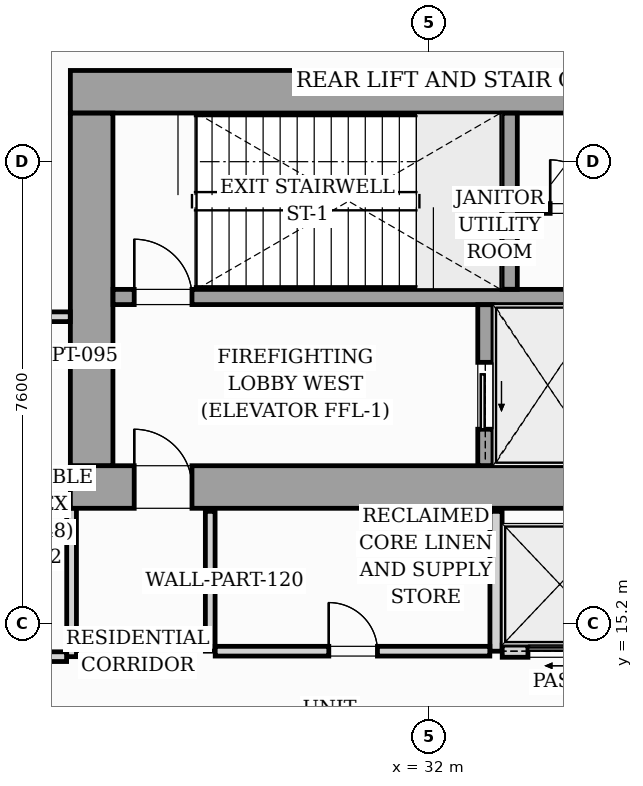
"""IFC4 building model, lengths in metres.
Left out: names, types, materials, properties, quantities, classifications, styles, units other than length and angle.
Written with IfcOpenShell. Run it as: python <this file> out.ifc"""

import sys

from ifc_helpers import new_model, si_unit, direction, frame, frame_2d, origin, origin_2d, place, context, subcontext, project, spatial, rectangle, i_section, extrude, source, transform, mapped, element, fill, save


model = new_model("IFC4")
c1 = context("Model", 3, precision=1e-05, world=origin(), true_north=direction((0.0, 1.0)))
c2 = subcontext(c1, "Body", "Model", "MODEL_VIEW")
j1 = project(units=[si_unit("LENGTHUNIT", "METRE"), si_unit("PLANEANGLEUNIT", "RADIAN")], contexts=[c1])
p1 = place(None, origin())
s1 = spatial("IfcSite", under=j1, at=p1, CompositionType="ELEMENT")
p2 = place(p1, origin())
s2 = spatial("IfcBuilding", under=s1, at=p2, CompositionType="ELEMENT")
p3 = place(p2, frame((0.0, 0.0, 167.8)))
s3 = spatial("IfcBuildingStorey", under=s2, at=p3, CompositionType="ELEMENT", Elevation=167.8)
m1 = source(origin(), c2, "Body", "SweptSolid", [
    extrude(i_section(OverallWidth=0.416, OverallDepth=0.446, WebThickness=0.039, FlangeThickness=0.063, FilletRadius=0.018, at=origin_2d()), origin(), (0.0, 0.0, 1.0), 5.196),
])
for number, where, z_axis, x_axis in (
    (1, (26.4, 17.4, 0.002), (0.0, 0.0, 1.0), (1.0, 0.0, 0.0)),
    (2, (33.12, 17.4, 0.002), (0.0, 0.0, 1.0), (1.0, 0.0, 0.0)),
    (3, (26.4, 24.0, 0.002), (0.0, 0.0, 1.0), (1.0, 0.0, 0.0)),
    (4, (33.12, 24.0, 0.002), (0.0, 0.0, 1.0), (1.0, 0.0, 0.0)),
):
    element("IfcColumn", number, at=place(p3, frame(where, z_axis=z_axis, x_axis=x_axis)), inside=s3, PredefinedType="PILASTER", context=c2, shape_type="MappedRepresentation", body=[
        mapped(m1, transform((0.0, 0.0, 0.0), scale=1.0)),
    ])
p4 = place(p3, frame((26.1, 17.45, 0.0), z_axis=(0.0, 0.0, 1.0), x_axis=(1.0, 0.0, 0.0)))
e5 = element("IfcWall", 5, at=p4, inside=s3, PredefinedType="SHEAR", context=c2, shape_type="SweptSolid", body=[
    extrude(rectangle(XDim=19.8, YDim=0.7, at=frame_2d((9.9, 0.0))), origin(), (0.0, 0.0, 1.0), 5.2),
])
p5 = place(p4, frame((1.05, 0.0, 0.0)))
e6 = element("IfcOpeningElement", 6, at=p5, cuts=e5, PredefinedType="OPENING", context=c2, shape_type="SweptSolid", body=[
    extrude(rectangle(XDim=0.95, YDim=2.06, at=frame_2d((0.475, 1.03))), frame((0.0, 0.36, 0.0), z_axis=(0.0, -1.0, 0.0), x_axis=(1.0, 0.0, 0.0)), (0.0, 0.0, 1.0), 0.72),
])
p6 = place(p4, frame((9.48, 0.0, 0.0)))
e7 = element("IfcOpeningElement", 7, at=p6, cuts=e5, PredefinedType="OPENING", context=c2, shape_type="SweptSolid", body=[
    extrude(rectangle(XDim=0.9, YDim=2.06, at=frame_2d((0.45, 1.03))), frame((0.0, 0.36, 0.0), z_axis=(0.0, -1.0, 0.0), x_axis=(1.0, 0.0, 0.0)), (0.0, 0.0, 1.0), 0.72),
])
p7 = place(p4, frame((17.65, 0.0, 0.0)))
e8 = element("IfcOpeningElement", 8, at=p7, cuts=e5, PredefinedType="OPENING", context=c2, shape_type="SweptSolid", body=[
    extrude(rectangle(XDim=0.95, YDim=2.06, at=frame_2d((0.475, 1.03))), frame((0.0, 0.36, 0.0), z_axis=(0.0, -1.0, 0.0), x_axis=(1.0, 0.0, 0.0)), (0.0, 0.0, 1.0), 0.72),
])
p8 = place(p3, frame((26.1, 23.95, 0.0), z_axis=(0.0, 0.0, 1.0), x_axis=(1.0, 0.0, 0.0)))
e9 = element("IfcWall", 9, at=p8, inside=s3, PredefinedType="SHEAR", context=c2, shape_type="SweptSolid", body=[
    extrude(rectangle(XDim=19.8, YDim=0.7, at=frame_2d((9.9, 0.0))), origin(), (0.0, 0.0, 1.0), 5.2),
])
p9 = place(p3, frame((26.45, 17.802, 0.0), z_axis=(0.0, 0.0, 1.0), x_axis=(0.0, 1.0, 0.0)))
e10 = element("IfcWall", 10, at=p9, inside=s3, PredefinedType="SHEAR", context=c2, shape_type="SweptSolid", body=[
    extrude(rectangle(XDim=5.796, YDim=0.7, at=frame_2d((2.898, 0.0))), origin(), (0.0, 0.0, 1.0), 5.2),
])
p10 = place(p3, frame((26.802, 20.575, 0.0), z_axis=(0.0, 0.0, 1.0), x_axis=(1.0, 0.0, 0.0)))
e11 = element("IfcWall", 11, at=p10, inside=s3, PredefinedType="SOLIDWALL", context=c2, shape_type="SweptSolid", body=[
    extrude(rectangle(XDim=8.148, YDim=0.25, at=frame_2d((4.074, 0.0))), origin(), (0.0, 0.0, 1.0), 5.2),
])
p11 = place(p10, frame((0.348, 0.0, 0.0)))
e12 = element("IfcOpeningElement", 12, at=p11, cuts=e11, PredefinedType="OPENING", context=c2, shape_type="SweptSolid", body=[
    extrude(rectangle(XDim=0.95, YDim=2.06, at=frame_2d((0.475, 1.03))), frame((0.0, 0.135, 0.0), z_axis=(0.0, -1.0, 0.0), x_axis=(1.0, 0.0, 0.0)), (0.0, 0.0, 1.0), 0.27),
])
p12 = place(p3, frame((33.325, 20.702, 0.0), z_axis=(0.0, 0.0, 1.0), x_axis=(0.0, 1.0, 0.0)))
e13 = element("IfcWall", 13, at=p12, inside=s3, PredefinedType="SOLIDWALL", context=c2, shape_type="SweptSolid", body=[
    extrude(rectangle(XDim=2.896, YDim=0.25, at=frame_2d((1.448, 0.0))), origin(), (0.0, 0.0, 1.0), 5.2),
])
p13 = place(p3, frame((32.925, 17.802, 0.0), z_axis=(0.0, 0.0, 1.0), x_axis=(0.0, 1.0, 0.0)))
e14 = element("IfcWall", 14, at=p13, inside=s3, PredefinedType="SOLIDWALL", context=c2, shape_type="SweptSolid", body=[
    extrude(rectangle(XDim=2.646, YDim=0.25, at=frame_2d((1.323, 0.0))), origin(), (0.0, 0.0, 1.0), 5.2),
])
p14 = place(p13, frame((0.598, 0.0, 0.0)))
e15 = element("IfcOpeningElement", 15, at=p14, cuts=e14, PredefinedType="OPENING", context=c2, shape_type="SweptSolid", body=[
    extrude(rectangle(XDim=1.1, YDim=2.08, at=frame_2d((0.55, 1.04))), frame((0.0, 0.135, 0.0), z_axis=(0.0, -1.0, 0.0), x_axis=(1.0, 0.0, 0.0)), (0.0, 0.0, 1.0), 0.27),
])
p15 = place(p3, frame((33.452, 22.03, 0.0), z_axis=(0.0, 0.0, 1.0), x_axis=(1.0, 0.0, 0.0)))
e16 = element("IfcWall", 16, at=p15, inside=s3, PredefinedType="PARTITIONING", context=c2, shape_type="SweptSolid", body=[
    extrude(rectangle(XDim=5.096, YDim=0.16, at=frame_2d((2.548, 0.0))), origin(), (0.0, 0.0, 1.0), 4.94),
])
p16 = place(p15, frame((0.538, 0.0, 0.0)))
e17 = element("IfcOpeningElement", 17, at=p16, cuts=e16, PredefinedType="OPENING", context=c2, shape_type="SweptSolid", body=[
    extrude(rectangle(XDim=0.8, YDim=2.05, at=frame_2d((0.4, 1.025))), frame((0.0, 0.09, 0.0), z_axis=(0.0, -1.0, 0.0), x_axis=(1.0, 0.0, 0.0)), (0.0, 0.0, 1.0), 0.18),
])
p17 = place(p15, frame((3.158, 0.0, 0.0)))
e18 = element("IfcOpeningElement", 18, at=p17, cuts=e16, PredefinedType="OPENING", context=c2, shape_type="SweptSolid", body=[
    extrude(rectangle(XDim=0.8, YDim=2.05, at=frame_2d((0.4, 1.025))), frame((0.0, 0.09, 0.0), z_axis=(0.0, -1.0, 0.0), x_axis=(1.0, 0.0, 0.0)), (0.0, 0.0, 1.0), 0.18),
])
p18 = place(p3, frame((28.4, 14.75, 0.0), z_axis=(0.0, 0.0, 1.0), x_axis=(0.0, 1.0, 0.0)))
e19 = element("IfcWall", 19, at=p18, inside=s3, PredefinedType="PARTITIONING", context=c2, shape_type="SweptSolid", body=[
    extrude(rectangle(XDim=2.3, YDim=0.16, at=frame_2d((1.15, 0.0))), origin(), (0.0, 0.0, 1.0), 4.94),
])
p19 = place(p3, frame((33.1, 14.75, 0.0), z_axis=(0.0, 0.0, 1.0), x_axis=(0.0, 1.0, 0.0)))
e20 = element("IfcWall", 20, at=p19, inside=s3, PredefinedType="PARTITIONING", context=c2, shape_type="SweptSolid", body=[
    extrude(rectangle(XDim=2.3, YDim=0.2, at=frame_2d((1.15, 0.0))), origin(), (0.0, 0.0, 1.0), 4.94),
])
p20 = place(p3, frame((28.482, 14.75, 0.0), z_axis=(0.0, 0.0, 1.0), x_axis=(1.0, 0.0, 0.0)))
e21 = element("IfcWall", 21, at=p20, inside=s3, PredefinedType="PARTITIONING", context=c2, shape_type="SweptSolid", body=[
    extrude(rectangle(XDim=4.516, YDim=0.16, at=frame_2d((2.258, 0.0))), origin(), (0.0, 0.0, 1.0), 4.94),
])
p21 = place(p20, frame((1.868, 0.0, 0.0)))
e22 = element("IfcOpeningElement", 22, at=p21, cuts=e21, PredefinedType="OPENING", context=c2, shape_type="SweptSolid", body=[
    extrude(rectangle(XDim=0.8, YDim=2.05, at=frame_2d((0.4, 1.025))), frame((0.0, 0.09, 0.0), z_axis=(0.0, -1.0, 0.0), x_axis=(1.0, 0.0, 0.0)), (0.0, 0.0, 1.0), 0.18),
])
p22 = place(p3, frame((33.202, 14.75, 0.0), z_axis=(0.0, 0.0, 1.0), x_axis=(1.0, 0.0, 0.0)))
e23 = element("IfcWall", 23, at=p22, inside=s3, PredefinedType="PARTITIONING", context=c2, shape_type="SweptSolid", body=[
    extrude(rectangle(XDim=1.896, YDim=0.2, at=frame_2d((0.948, 0.0))), origin(), (0.0, 0.0, 1.0), 4.94),
])
p23 = place(p22, frame((0.423, 0.0, 0.0)))
e24 = element("IfcOpeningElement", 24, at=p23, cuts=e23, PredefinedType="OPENING", context=c2, shape_type="SweptSolid", body=[
    extrude(rectangle(XDim=1.05, YDim=2.08, at=frame_2d((0.525, 1.04))), frame((0.0, 0.11, 0.0), z_axis=(0.0, -1.0, 0.0), x_axis=(1.0, 0.0, 0.0)), (0.0, 0.0, 1.0), 0.22),
])
p24 = place(p3, frame((24.732, 20.25, 0.0), z_axis=(0.0, 0.0, 1.0), x_axis=(1.0, 0.0, 0.0)))
e25 = element("IfcWall", 25, at=p24, inside=s3, PredefinedType="PARTITIONING", context=c2, shape_type="SweptSolid", body=[
    extrude(rectangle(XDim=1.366, YDim=0.16, at=frame_2d((0.683, 0.0))), origin(), (0.0, 0.0, 1.0), 4.94),
])
p25 = place(p3, frame((26.12, 14.66, 0.0), z_axis=(0.0, 0.0, 1.0), x_axis=(0.0, 1.0, 0.0)))
e26 = element("IfcWall", 26, at=p25, inside=s3, PredefinedType="PARTITIONING", context=c2, shape_type="SweptSolid", body=[
    extrude(rectangle(XDim=2.438, YDim=0.16, at=frame_2d((1.219, 0.0))), origin(), (0.0, 0.0, 1.0), 4.94),
])
p26 = place(p3, frame((24.732, 14.66, 0.0), z_axis=(0.0, 0.0, 1.0), x_axis=(1.0, 0.0, 0.0)))
e27 = element("IfcWall", 27, at=p26, inside=s3, PredefinedType="PARTITIONING", context=c2, shape_type="SweptSolid", body=[
    extrude(rectangle(XDim=1.306, YDim=0.16, at=frame_2d((0.653, 0.0))), origin(), (0.0, 0.0, 1.0), 4.94),
])
m2 = source(origin(), c2, "Body", "SweptSolid", [
    extrude(rectangle(XDim=0.95, YDim=2.06, at=frame_2d((0.475, 1.03))), frame((0.0, 0.025, 0.0), z_axis=(0.0, -1.0, 0.0), x_axis=(1.0, 0.0, 0.0)), (0.0, 0.0, 1.0), 0.05),
])
p27 = place(p5, origin())
e28 = element("IfcDoor", 28, at=p27, inside=s3, OperationType="SINGLE_SWING_LEFT", PredefinedType="DOOR", context=c2, shape_type="MappedRepresentation", body=[
    mapped(m2, transform((0.0, 0.0, 0.0), scale=1.0)),
])
fill(e6, e28)
p28 = place(p11, origin())
e29 = element("IfcDoor", 29, at=p28, inside=s3, OperationType="SINGLE_SWING_LEFT", PredefinedType="DOOR", context=c2, shape_type="MappedRepresentation", body=[
    mapped(m2, transform((0.0, 0.0, 0.0), scale=1.0)),
])
fill(e12, e29)
m3 = source(origin(), c2, "Body", "SweptSolid", [
    extrude(rectangle(XDim=1.1, YDim=2.08, at=frame_2d((0.55, 1.04))), frame((0.0, 0.025, 0.0), z_axis=(0.0, -1.0, 0.0), x_axis=(1.0, 0.0, 0.0)), (0.0, 0.0, 1.0), 0.05),
])
p29 = place(p14, origin())
e30 = element("IfcDoor", 30, at=p29, inside=s3, OperationType="SLIDING_TO_LEFT", PredefinedType="DOOR", context=c2, shape_type="MappedRepresentation", body=[
    mapped(m3, transform((0.0, 0.0, 0.0), scale=1.0)),
])
fill(e15, e30)
m4 = source(origin(), c2, "Body", "SweptSolid", [
    extrude(rectangle(XDim=0.8, YDim=2.05, at=frame_2d((0.4, 1.025))), frame((0.0, 0.025, 0.0), z_axis=(0.0, -1.0, 0.0), x_axis=(1.0, 0.0, 0.0)), (0.0, 0.0, 1.0), 0.05),
])
p30 = place(p16, origin())
e31 = element("IfcDoor", 31, at=p30, inside=s3, OperationType="SINGLE_SWING_LEFT", PredefinedType="DOOR", context=c2, shape_type="MappedRepresentation", body=[
    mapped(m4, transform((0.0, 0.0, 0.0), scale=1.0)),
])
fill(e17, e31)
p31 = place(p21, origin())
e32 = element("IfcDoor", 32, at=p31, inside=s3, OperationType="SINGLE_SWING_LEFT", PredefinedType="DOOR", context=c2, shape_type="MappedRepresentation", body=[
    mapped(m4, transform((0.0, 0.0, 0.0), scale=1.0)),
])
fill(e22, e32)
m5 = source(origin(), c2, "Body", "SweptSolid", [
    extrude(rectangle(XDim=1.05, YDim=2.08, at=frame_2d((0.525, 1.04))), frame((0.0, 0.025, 0.0), z_axis=(0.0, -1.0, 0.0), x_axis=(1.0, 0.0, 0.0)), (0.0, 0.0, 1.0), 0.05),
])
p32 = place(p23, origin())
e33 = element("IfcDoor", 33, at=p32, inside=s3, OperationType="SLIDING_TO_LEFT", PredefinedType="DOOR", context=c2, shape_type="MappedRepresentation", body=[
    mapped(m5, transform((0.0, 0.0, 0.0), scale=1.0)),
])
fill(e24, e33)
save(model, sys.argv[1])
